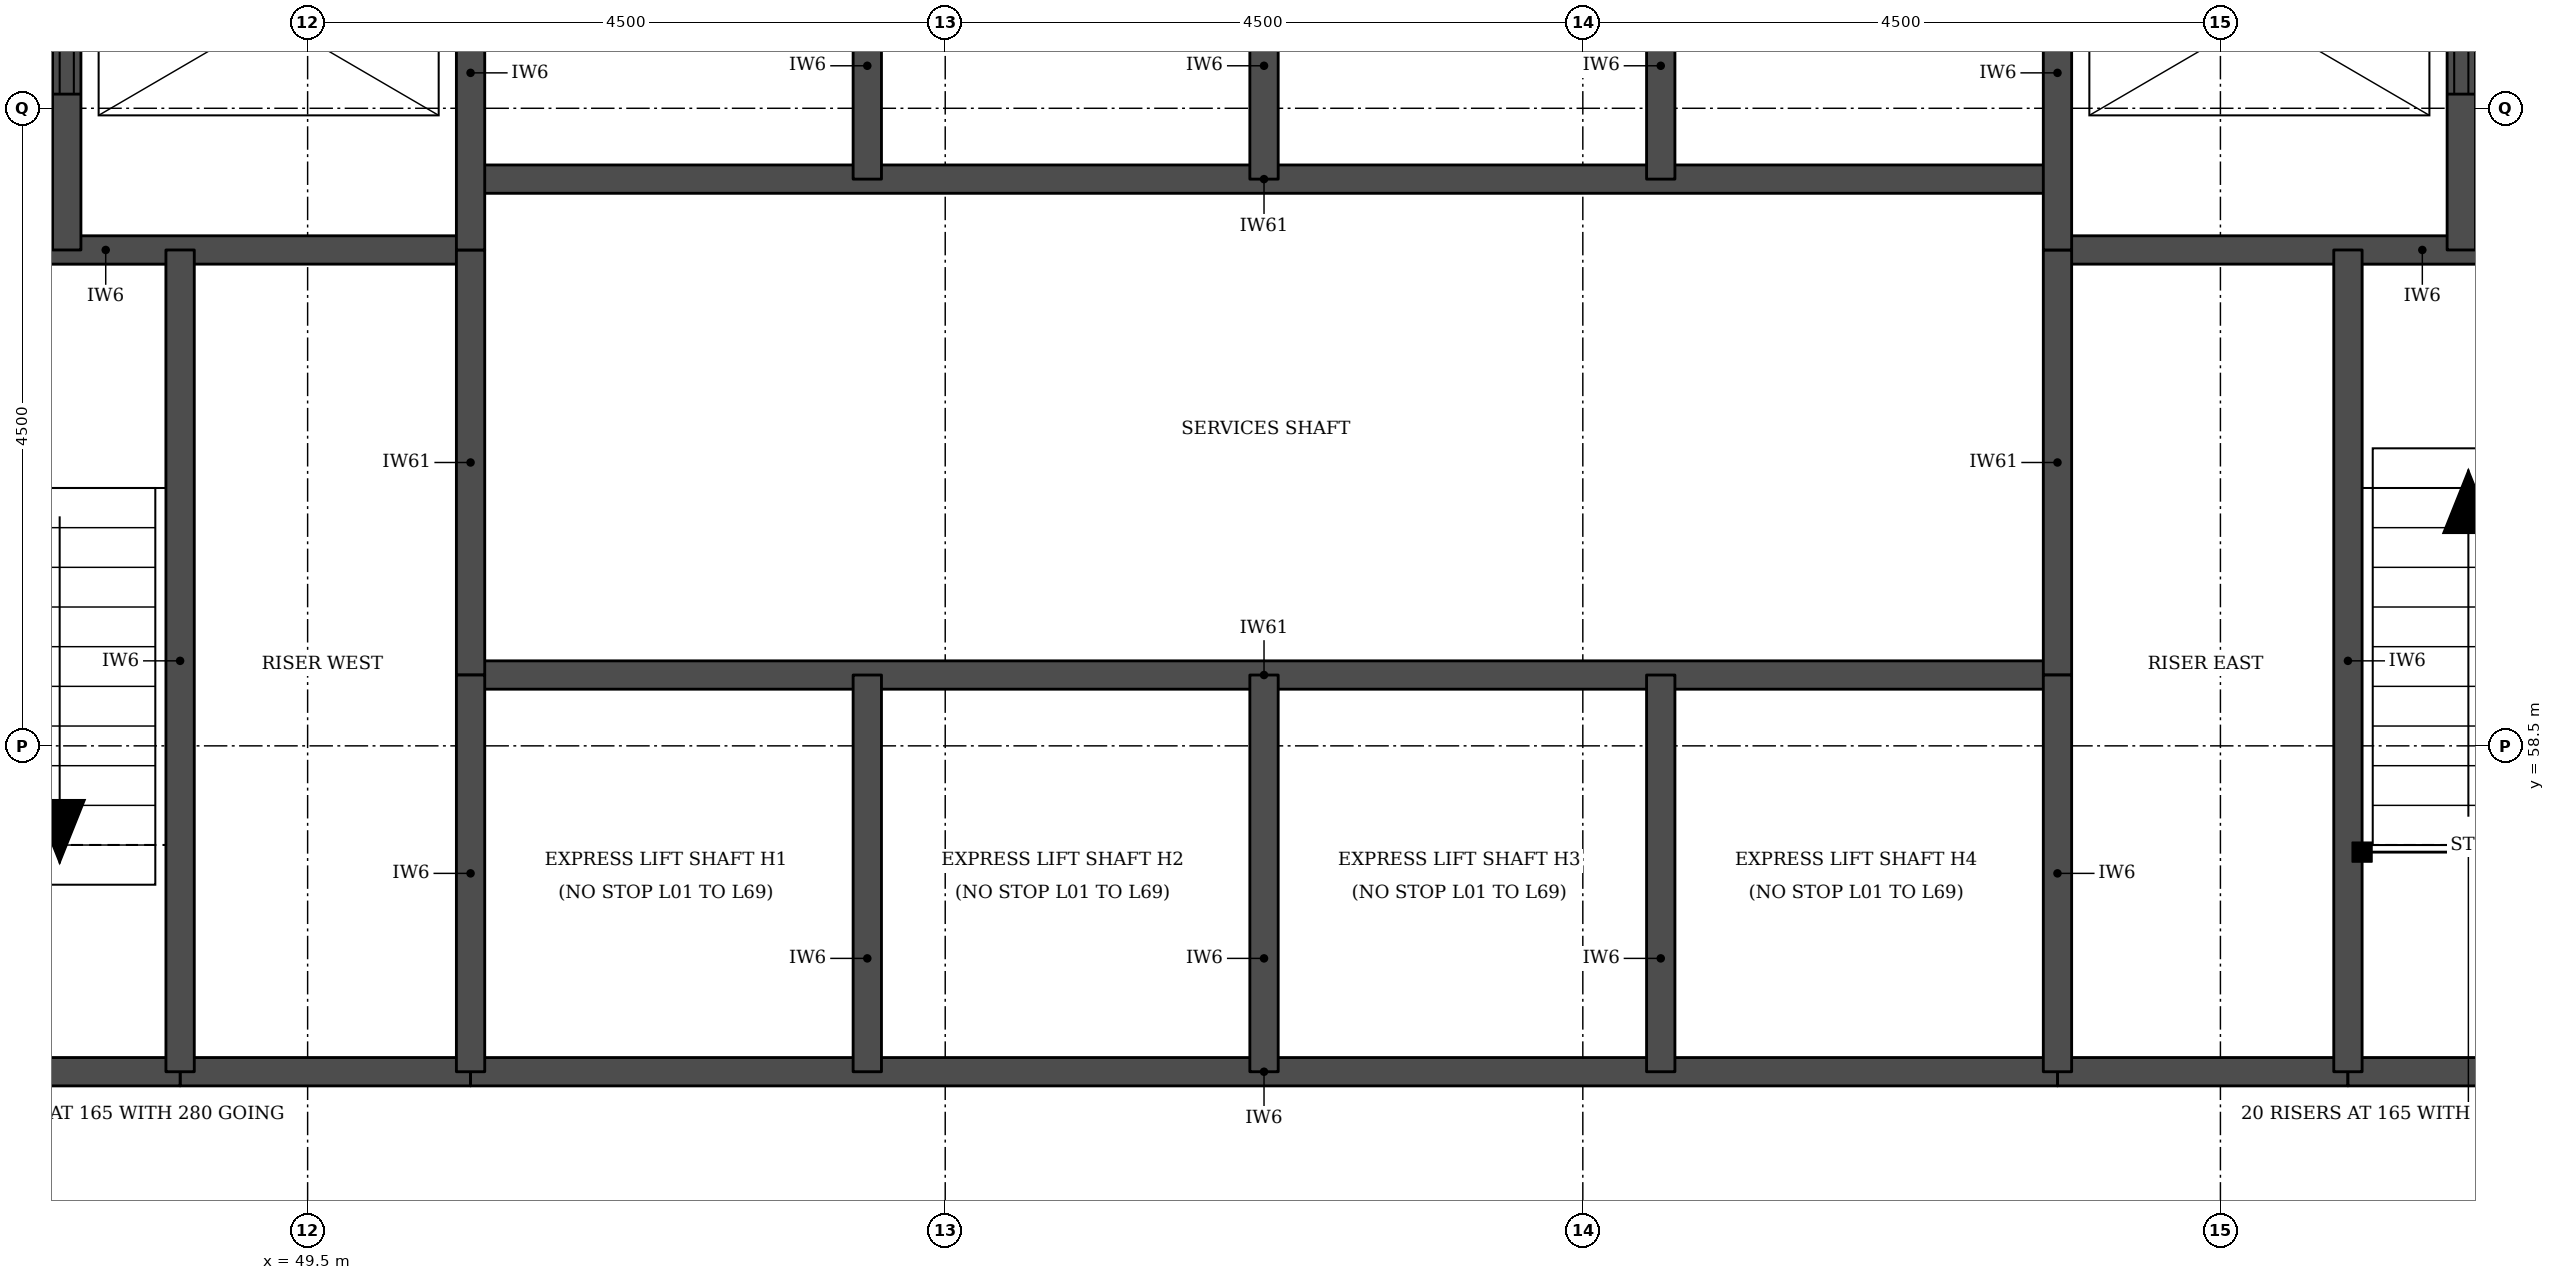
"""IFC4 building model, lengths in metres.
Left out: names, types, materials, properties, quantities, classifications, styles, units other than length and angle.
Written with IfcOpenShell. Run it as: python <this file> out.ifc"""

import sys

from ifc_helpers import new_model, si_unit, direction, frame, frame_2d, origin, place, context, subcontext, project, spatial, rectangle, extrude, element, fill, save


model = new_model("IFC4")
c1 = context("Model", 3, precision=1e-05, world=origin(), true_north=direction((0.0, 1.0)))
c2 = subcontext(c1, "Body", "Model", "MODEL_VIEW")
j1 = project(units=[si_unit("LENGTHUNIT", "METRE"), si_unit("PLANEANGLEUNIT", "RADIAN")], contexts=[c1])
p1 = place(None, origin())
s1 = spatial("IfcSite", under=j1, at=p1, CompositionType="ELEMENT")
p2 = place(p1, origin())
s2 = spatial("IfcBuilding", under=s1, at=p2, CompositionType="ELEMENT")
p3 = place(p2, frame((0.0, 0.0, 46.2)))
s3 = spatial("IfcBuildingStorey", under=s2, at=p3, CompositionType="ELEMENT", Elevation=46.2)
for number, where, z_axis, x_axis in (
    (1, (48.6, 56.2, 0.0), (0.0, 0.0, 1.0), (1.0, 0.0, 0.0)),
    (2, (61.85, 56.2, 0.0), (0.0, 0.0, 1.0), (1.0, 0.0, 0.0)),
):
    element("IfcWall", number, at=place(p3, frame(where, z_axis=z_axis, x_axis=x_axis)), inside=s3, PredefinedType="SOLIDWALL", context=c2, shape_type="SweptSolid", body=[
        extrude(rectangle(XDim=2.05, YDim=0.2, at=frame_2d((1.025, 0.0))), origin(), (0.0, 0.0, 1.0), 3.08),
    ])
p4 = place(p3, frame((45.5, 56.2, 0.0), z_axis=(0.0, 0.0, 1.0), x_axis=(1.0, 0.0, 0.0)))
e3 = element("IfcWall", 3, at=p4, inside=s3, PredefinedType="SOLIDWALL", context=c2, shape_type="SweptSolid", body=[
    extrude(rectangle(XDim=3.1, YDim=0.2, at=frame_2d((1.55, 0.0))), origin(), (0.0, 0.0, 1.0), 3.08),
])
p5 = place(p3, frame((50.65, 56.2, 0.0), z_axis=(0.0, 0.0, 1.0), x_axis=(1.0, 0.0, 0.0)))
e4 = element("IfcWall", 4, at=p5, inside=s3, PredefinedType="SOLIDWALL", context=c2, shape_type="SweptSolid", body=[
    extrude(rectangle(XDim=11.2, YDim=0.2, at=frame_2d((5.6, 0.0))), origin(), (0.0, 0.0, 1.0), 3.08),
])
p6 = place(p3, frame((63.9, 56.2, 0.0), z_axis=(0.0, 0.0, 1.0), x_axis=(1.0, 0.0, 0.0)))
e5 = element("IfcWall", 5, at=p6, inside=s3, PredefinedType="SOLIDWALL", context=c2, shape_type="SweptSolid", body=[
    extrude(rectangle(XDim=3.1, YDim=0.2, at=frame_2d((1.55, 0.0))), origin(), (0.0, 0.0, 1.0), 3.08),
])
p7 = place(p3, frame((50.65, 59.0, 0.0), z_axis=(0.0, 0.0, 1.0), x_axis=(1.0, 0.0, 0.0)))
e6 = element("IfcWall", 6, at=p7, inside=s3, PredefinedType="SOLIDWALL", context=c2, shape_type="SweptSolid", body=[
    extrude(rectangle(XDim=11.2, YDim=0.2, at=frame_2d((5.6, 0.0))), origin(), (0.0, 0.0, 1.0), 3.3),
])
for number, where, z_axis, x_axis in (
    (7, (45.5, 62.0, 0.0), (0.0, 0.0, 1.0), (1.0, 0.0, 0.0)),
    (8, (61.85, 62.0, 0.0), (0.0, 0.0, 1.0), (1.0, 0.0, 0.0)),
):
    element("IfcWall", number, at=place(p3, frame(where, z_axis=z_axis, x_axis=x_axis)), inside=s3, PredefinedType="SOLIDWALL", context=c2, shape_type="SweptSolid", body=[
        extrude(rectangle(XDim=5.15, YDim=0.2, at=frame_2d((2.575, 0.0))), origin(), (0.0, 0.0, 1.0), 3.08),
    ])
p8 = place(p3, frame((50.65, 62.5, 0.0), z_axis=(0.0, 0.0, 1.0), x_axis=(1.0, 0.0, 0.0)))
e9 = element("IfcWall", 9, at=p8, inside=s3, PredefinedType="SOLIDWALL", context=c2, shape_type="SweptSolid", body=[
    extrude(rectangle(XDim=11.2, YDim=0.2, at=frame_2d((5.6, 0.0))), origin(), (0.0, 0.0, 1.0), 3.3),
])
p9 = place(p3, frame((47.8, 62.0, 0.0), z_axis=(0.0, 0.0, 1.0), x_axis=(0.0, 1.0, 0.0)))
e10 = element("IfcWall", 10, at=p9, inside=s3, PredefinedType="SOLIDWALL", context=c2, shape_type="SweptSolid", body=[
    extrude(rectangle(XDim=3.3, YDim=0.2, at=frame_2d((1.65, 0.0))), origin(), (0.0, 0.0, 1.0), 3.08),
])
p10 = place(p9, frame((1.1, 0.0, 0.0)))
e11 = element("IfcOpeningElement", 11, at=p10, cuts=e10, PredefinedType="OPENING", context=c2, shape_type="SweptSolid", body=[
    extrude(rectangle(XDim=1.1, YDim=2.1, at=frame_2d((0.55, 1.05))), frame((0.0, 0.11, 0.0), z_axis=(0.0, -1.0, 0.0), x_axis=(1.0, 0.0, 0.0)), (0.0, 0.0, 1.0), 0.22),
])
p11 = place(p3, frame((48.6, 56.2, 0.0), z_axis=(0.0, 0.0, 1.0), x_axis=(0.0, 1.0, 0.0)))
e12 = element("IfcWall", 12, at=p11, inside=s3, PredefinedType="SOLIDWALL", context=c2, shape_type="SweptSolid", body=[
    extrude(rectangle(XDim=5.8, YDim=0.2, at=frame_2d((2.9, 0.0))), origin(), (0.0, 0.0, 1.0), 3.08),
])
p12 = place(p3, frame((50.65, 59.0, 0.0), z_axis=(0.0, 0.0, 1.0), x_axis=(0.0, 1.0, 0.0)))
e13 = element("IfcWall", 13, at=p12, inside=s3, PredefinedType="SOLIDWALL", context=c2, shape_type="SweptSolid", body=[
    extrude(rectangle(XDim=3.0, YDim=0.2, at=frame_2d((1.5, 0.0))), origin(), (0.0, 0.0, 1.0), 3.3),
])
p13 = place(p3, frame((50.65, 56.2, 0.0), z_axis=(0.0, 0.0, 1.0), x_axis=(0.0, 1.0, 0.0)))
e14 = element("IfcWall", 14, at=p13, inside=s3, PredefinedType="SOLIDWALL", context=c2, shape_type="SweptSolid", body=[
    extrude(rectangle(XDim=2.8, YDim=0.2, at=frame_2d((1.4, 0.0))), origin(), (0.0, 0.0, 1.0), 3.08),
])
p14 = place(p3, frame((50.65, 62.0, 0.0), z_axis=(0.0, 0.0, 1.0), x_axis=(0.0, 1.0, 0.0)))
e15 = element("IfcWall", 15, at=p14, inside=s3, PredefinedType="SOLIDWALL", context=c2, shape_type="SweptSolid", body=[
    extrude(rectangle(XDim=3.3, YDim=0.2, at=frame_2d((1.65, 0.0))), origin(), (0.0, 0.0, 1.0), 3.08),
])
for number, where, z_axis, x_axis in (
    (16, (53.45, 56.2, 0.0), (0.0, 0.0, 1.0), (0.0, 1.0, 0.0)),
    (17, (53.45, 62.5, 0.0), (0.0, 0.0, 1.0), (0.0, 1.0, 0.0)),
    (18, (56.25, 56.2, 0.0), (0.0, 0.0, 1.0), (0.0, 1.0, 0.0)),
    (19, (56.25, 62.5, 0.0), (0.0, 0.0, 1.0), (0.0, 1.0, 0.0)),
    (20, (59.05, 56.2, 0.0), (0.0, 0.0, 1.0), (0.0, 1.0, 0.0)),
    (21, (59.05, 62.5, 0.0), (0.0, 0.0, 1.0), (0.0, 1.0, 0.0)),
):
    element("IfcWall", number, at=place(p3, frame(where, z_axis=z_axis, x_axis=x_axis)), inside=s3, PredefinedType="SOLIDWALL", context=c2, shape_type="SweptSolid", body=[
        extrude(rectangle(XDim=2.8, YDim=0.2, at=frame_2d((1.4, 0.0))), origin(), (0.0, 0.0, 1.0), 3.08),
    ])
p15 = place(p3, frame((61.85, 59.0, 0.0), z_axis=(0.0, 0.0, 1.0), x_axis=(0.0, 1.0, 0.0)))
e22 = element("IfcWall", 22, at=p15, inside=s3, PredefinedType="SOLIDWALL", context=c2, shape_type="SweptSolid", body=[
    extrude(rectangle(XDim=3.0, YDim=0.2, at=frame_2d((1.5, 0.0))), origin(), (0.0, 0.0, 1.0), 3.3),
])
p16 = place(p3, frame((61.85, 56.2, 0.0), z_axis=(0.0, 0.0, 1.0), x_axis=(0.0, 1.0, 0.0)))
e23 = element("IfcWall", 23, at=p16, inside=s3, PredefinedType="SOLIDWALL", context=c2, shape_type="SweptSolid", body=[
    extrude(rectangle(XDim=2.8, YDim=0.2, at=frame_2d((1.4, 0.0))), origin(), (0.0, 0.0, 1.0), 3.08),
])
p17 = place(p3, frame((61.85, 62.0, 0.0), z_axis=(0.0, 0.0, 1.0), x_axis=(0.0, 1.0, 0.0)))
e24 = element("IfcWall", 24, at=p17, inside=s3, PredefinedType="SOLIDWALL", context=c2, shape_type="SweptSolid", body=[
    extrude(rectangle(XDim=3.3, YDim=0.2, at=frame_2d((1.65, 0.0))), origin(), (0.0, 0.0, 1.0), 3.08),
])
p18 = place(p3, frame((63.9, 56.2, 0.0), z_axis=(0.0, 0.0, 1.0), x_axis=(0.0, 1.0, 0.0)))
e25 = element("IfcWall", 25, at=p18, inside=s3, PredefinedType="SOLIDWALL", context=c2, shape_type="SweptSolid", body=[
    extrude(rectangle(XDim=5.8, YDim=0.2, at=frame_2d((2.9, 0.0))), origin(), (0.0, 0.0, 1.0), 3.08),
])
p19 = place(p3, frame((64.7, 62.0, 0.0), z_axis=(0.0, 0.0, 1.0), x_axis=(0.0, 1.0, 0.0)))
e26 = element("IfcWall", 26, at=p19, inside=s3, PredefinedType="SOLIDWALL", context=c2, shape_type="SweptSolid", body=[
    extrude(rectangle(XDim=3.3, YDim=0.2, at=frame_2d((1.65, 0.0))), origin(), (0.0, 0.0, 1.0), 3.08),
])
p20 = place(p19, frame((1.1, 0.0, 0.0)))
e27 = element("IfcOpeningElement", 27, at=p20, cuts=e26, PredefinedType="OPENING", context=c2, shape_type="SweptSolid", body=[
    extrude(rectangle(XDim=1.1, YDim=2.1, at=frame_2d((0.55, 1.05))), frame((0.0, 0.11, 0.0), z_axis=(0.0, -1.0, 0.0), x_axis=(1.0, 0.0, 0.0)), (0.0, 0.0, 1.0), 0.22),
])
p21 = place(p10, origin())
e28 = element("IfcDoor", 28, at=p21, inside=s3, OperationType="DOUBLE_DOOR_SLIDING", PredefinedType="DOOR", context=c2, shape_type="SweptSolid", body=[
    extrude(rectangle(XDim=1.1, YDim=2.1, at=frame_2d((0.55, 1.05))), frame((0.0, 0.025, 0.0), z_axis=(0.0, -1.0, 0.0), x_axis=(1.0, 0.0, 0.0)), (0.0, 0.0, 1.0), 0.05),
])
fill(e11, e28)
p22 = place(p20, origin())
e29 = element("IfcDoor", 29, at=p22, inside=s3, OperationType="DOUBLE_DOOR_SLIDING", PredefinedType="DOOR", context=c2, shape_type="SweptSolid", body=[
    extrude(rectangle(XDim=1.1, YDim=2.1, at=frame_2d((0.55, 1.05))), frame((0.0, 0.025, 0.0), z_axis=(0.0, -1.0, 0.0), x_axis=(1.0, 0.0, 0.0)), (0.0, 0.0, 1.0), 0.05),
])
fill(e27, e29)
save(model, sys.argv[1])
